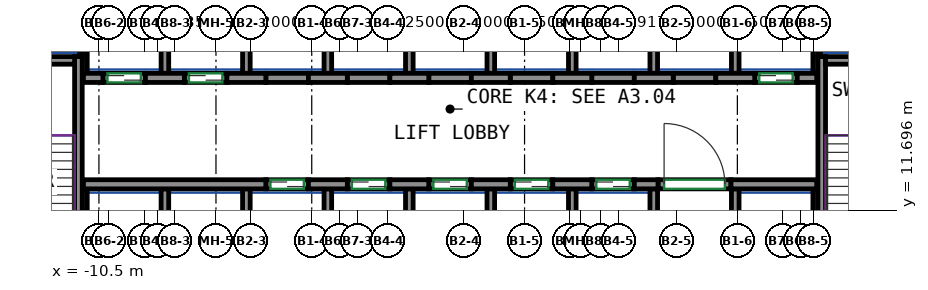
"""IFC4 building model, lengths in metres.
Left out: names, types, materials, properties, quantities, classifications, styles, units other than length and angle.
Written with IfcOpenShell. Run it as: python <this file> out.ifc"""

import sys

from ifc_helpers import new_model, si_unit, direction, frame, frame_2d, origin, place, context, subcontext, project, spatial, rectangle, extrude, source, transform, mapped, element, fill, save


model = new_model("IFC4")
c1 = context("Model", 3, precision=1e-05, world=origin(), true_north=direction((0.0, 1.0)))
c2 = subcontext(c1, "Body", "Model", "MODEL_VIEW")
j1 = project(units=[si_unit("LENGTHUNIT", "METRE"), si_unit("PLANEANGLEUNIT", "RADIAN")], contexts=[c1])
p1 = place(None, origin())
s1 = spatial("IfcSite", under=j1, at=p1, CompositionType="ELEMENT")
p2 = place(p1, origin())
s2 = spatial("IfcBuilding", under=s1, at=p2, CompositionType="ELEMENT")
p3 = place(p2, frame((0.0, 0.0, 18.0)))
s3 = spatial("IfcBuildingStorey", under=s2, at=p3, CompositionType="ELEMENT", Elevation=18.0)
m1 = source(origin(), c2, "Body", "SweptSolid", [
    extrude(rectangle(XDim=7.75, YDim=0.25, at=frame_2d((3.875, 0.0))), origin(), (0.0, 0.0, 1.0), 4.1),
])
p4 = place(p3, frame((-11.175, 9.0, 0.0), z_axis=(0.0, 0.0, 1.0), x_axis=(0.0, 1.0, 0.0)))
e1 = element("IfcWall", 1, at=p4, inside=s3, PredefinedType="SHEAR", context=c2, shape_type="MappedRepresentation", body=[
    mapped(m1, transform((0.0, 0.0, 0.0))),
])
m2 = source(origin(), c2, "Body", "SweptSolid", [
    extrude(rectangle(XDim=3.7, YDim=0.25, at=frame_2d((1.85, 0.0))), origin(), (0.0, 0.0, 1.0), 4.1),
])
p5 = place(p3, frame((-15.0, 16.625, 0.0), z_axis=(0.0, 0.0, 1.0), x_axis=(1.0, 0.0, 0.0)))
e2 = element("IfcWall", 2, at=p5, inside=s3, PredefinedType="SHEAR", context=c2, shape_type="MappedRepresentation", body=[
    mapped(m2, transform((0.0, 0.0, 0.0))),
])
p6 = place(p3, frame((13.275, 9.0, 0.0), z_axis=(0.0, 0.0, 1.0), x_axis=(0.0, 1.0, 0.0)))
e3 = element("IfcWall", 3, at=p6, inside=s3, PredefinedType="SHEAR", context=c2, shape_type="MappedRepresentation", body=[
    mapped(m1, transform((0.0, 0.0, 0.0))),
])
m3 = source(origin(), c2, "Body", "SweptSolid", [
    extrude(rectangle(XDim=3.7, YDim=0.25, at=frame_2d((1.85, 0.0))), origin(), (0.0, 0.0, 1.0), 4.1),
])
p7 = place(p3, frame((13.4, 16.625, 0.0), z_axis=(0.0, 0.0, 1.0), x_axis=(1.0, 0.0, 0.0)))
e4 = element("IfcWall", 4, at=p7, inside=s3, PredefinedType="SHEAR", context=c2, shape_type="MappedRepresentation", body=[
    mapped(m3, transform((0.0, 0.0, 0.0))),
])
m4 = source(origin(), c2, "Body", "SweptSolid", [
    extrude(rectangle(XDim=6.0, YDim=0.3, at=frame_2d((3.0, 0.0))), origin(), (0.0, 0.0, 1.0), 4.1),
])
p8 = place(p3, frame((-11.01, 12.55, 0.0), z_axis=(0.0, 0.0, 1.0), x_axis=(1.0, 0.0, 0.0)))
e5 = element("IfcWall", 5, at=p8, inside=s3, PredefinedType="SHEAR", context=c2, shape_type="MappedRepresentation", body=[
    mapped(m4, transform((0.0, 0.0, 0.0))),
])
m5 = source(origin(), c2, "Body", "SweptSolid", [
    extrude(rectangle(XDim=1.28, YDim=0.3, at=frame_2d((0.64, 0.0))), origin(), (0.0, 0.0, 1.0), 4.1),
])
for number, where, z_axis, x_axis in (
    (6, (-3.61, 12.55, 0.0), (0.0, 0.0, 1.0), (1.0, 0.0, 0.0)),
    (7, (-0.93, 12.55, 0.0), (0.0, 0.0, 1.0), (1.0, 0.0, 0.0)),
    (8, (1.75, 12.55, 0.0), (0.0, 0.0, 1.0), (1.0, 0.0, 0.0)),
    (9, (4.43, 12.55, 0.0), (0.0, 0.0, 1.0), (1.0, 0.0, 0.0)),
):
    element("IfcWall", number, at=place(p3, frame(where, z_axis=z_axis, x_axis=x_axis)), inside=s3, PredefinedType="SHEAR", context=c2, shape_type="MappedRepresentation", body=[
        mapped(m5, transform((0.0, 0.0, 0.0))),
    ])
m6 = source(origin(), c2, "Body", "SweptSolid", [
    extrude(rectangle(XDim=0.78, YDim=0.3, at=frame_2d((0.39, 0.0))), origin(), (0.0, 0.0, 1.0), 4.1),
])
p9 = place(p3, frame((7.11, 12.55, 0.0), z_axis=(0.0, 0.0, 1.0), x_axis=(1.0, 0.0, 0.0)))
e10 = element("IfcWall", 10, at=p9, inside=s3, PredefinedType="SHEAR", context=c2, shape_type="MappedRepresentation", body=[
    mapped(m6, transform((0.0, 0.0, 0.0))),
])
m7 = source(origin(), c2, "Body", "SweptSolid", [
    extrude(rectangle(XDim=2.82, YDim=0.3, at=frame_2d((1.41, 0.0))), origin(), (0.0, 0.0, 1.0), 4.1),
])
p10 = place(p3, frame((10.29, 12.55, 0.0), z_axis=(0.0, 0.0, 1.0), x_axis=(1.0, 0.0, 0.0)))
e11 = element("IfcWall", 11, at=p10, inside=s3, PredefinedType="SHEAR", context=c2, shape_type="MappedRepresentation", body=[
    mapped(m7, transform((0.0, 0.0, 0.0))),
])
m8 = source(origin(), c2, "Body", "SweptSolid", [
    extrude(rectangle(XDim=0.64, YDim=0.3, at=frame_2d((0.32, 0.0))), origin(), (0.0, 0.0, 1.0), 4.1),
])
p11 = place(p3, frame((-11.01, 16.05, 0.0), z_axis=(0.0, 0.0, 1.0), x_axis=(1.0, 0.0, 0.0)))
e12 = element("IfcWall", 12, at=p11, inside=s3, PredefinedType="SHEAR", context=c2, shape_type="MappedRepresentation", body=[
    mapped(m8, transform((0.0, 0.0, 0.0))),
])
for number, where, z_axis, x_axis in (
    (13, (-8.97, 16.05, 0.0), (0.0, 0.0, 1.0), (1.0, 0.0, 0.0)),
    (14, (-6.29, 16.05, 0.0), (0.0, 0.0, 1.0), (1.0, 0.0, 0.0)),
    (15, (-3.61, 16.05, 0.0), (0.0, 0.0, 1.0), (1.0, 0.0, 0.0)),
    (16, (-0.93, 16.05, 0.0), (0.0, 0.0, 1.0), (1.0, 0.0, 0.0)),
    (17, (1.75, 16.05, 0.0), (0.0, 0.0, 1.0), (1.0, 0.0, 0.0)),
    (18, (4.43, 16.05, 0.0), (0.0, 0.0, 1.0), (1.0, 0.0, 0.0)),
):
    element("IfcWall", number, at=place(p3, frame(where, z_axis=z_axis, x_axis=x_axis)), inside=s3, PredefinedType="SHEAR", context=c2, shape_type="MappedRepresentation", body=[
        mapped(m5, transform((0.0, 0.0, 0.0))),
    ])
m9 = source(origin(), c2, "Body", "SweptSolid", [
    extrude(rectangle(XDim=1.28, YDim=0.3, at=frame_2d((0.64, 0.0))), origin(), (0.0, 0.0, 1.0), 4.1),
])
p12 = place(p3, frame((7.11, 16.05, 0.0), z_axis=(0.0, 0.0, 1.0), x_axis=(1.0, 0.0, 0.0)))
e19 = element("IfcWall", 19, at=p12, inside=s3, PredefinedType="SHEAR", context=c2, shape_type="MappedRepresentation", body=[
    mapped(m9, transform((0.0, 0.0, 0.0))),
])
p13 = place(p3, frame((9.79, 16.05, 0.0), z_axis=(0.0, 0.0, 1.0), x_axis=(1.0, 0.0, 0.0)))
e20 = element("IfcWall", 20, at=p13, inside=s3, PredefinedType="SHEAR", context=c2, shape_type="MappedRepresentation", body=[
    mapped(m5, transform((0.0, 0.0, 0.0))),
])
m10 = source(origin(), c2, "Body", "SweptSolid", [
    extrude(rectangle(XDim=0.64, YDim=0.3, at=frame_2d((0.32, 0.0))), origin(), (0.0, 0.0, 1.0), 4.1),
])
p14 = place(p3, frame((12.47, 16.05, 0.0), z_axis=(0.0, 0.0, 1.0), x_axis=(1.0, 0.0, 0.0)))
e21 = element("IfcWall", 21, at=p14, inside=s3, PredefinedType="SHEAR", context=c2, shape_type="MappedRepresentation", body=[
    mapped(m10, transform((0.0, 0.0, 0.0))),
])
m11 = source(origin(), c2, "Body", "SweptSolid", [
    extrude(rectangle(XDim=1.4, YDim=0.3, at=frame_2d((0.7, 0.0))), origin(), (0.0, 0.0, 1.0), 4.1),
])
p15 = place(p3, frame((-5.01, 12.55, 0.0), z_axis=(0.0, 0.0, 1.0), x_axis=(1.0, 0.0, 0.0)))
e22 = element("IfcWall", 22, at=p15, inside=s3, PredefinedType="PARTITIONING", context=c2, shape_type="MappedRepresentation", body=[
    mapped(m11, transform((0.0, 0.0, 0.0))),
])
p16 = place(p15, frame((0.15, 0.0, 0.0)))
e23 = element("IfcOpeningElement", 23, at=p16, cuts=e22, PredefinedType="OPENING", context=c2, shape_type="SweptSolid", body=[
    extrude(rectangle(XDim=1.1, YDim=2.1, at=frame_2d((0.55, 1.05))), frame((0.0, 0.16, 0.0), z_axis=(0.0, -1.0, 0.0), x_axis=(1.0, 0.0, 0.0)), (0.0, 0.0, 1.0), 0.32),
])
m12 = source(origin(), c2, "Body", "SweptSolid", [
    extrude(rectangle(XDim=1.4, YDim=0.3, at=frame_2d((0.7, 0.0))), origin(), (0.0, 0.0, 1.0), 4.1),
])
p17 = place(p3, frame((-2.33, 12.55, 0.0), z_axis=(0.0, 0.0, 1.0), x_axis=(1.0, 0.0, 0.0)))
e24 = element("IfcWall", 24, at=p17, inside=s3, PredefinedType="PARTITIONING", context=c2, shape_type="MappedRepresentation", body=[
    mapped(m12, transform((0.0, 0.0, 0.0))),
])
p18 = place(p17, frame((0.15, 0.0, 0.0)))
e25 = element("IfcOpeningElement", 25, at=p18, cuts=e24, PredefinedType="OPENING", context=c2, shape_type="SweptSolid", body=[
    extrude(rectangle(XDim=1.1, YDim=2.1, at=frame_2d((0.55, 1.05))), frame((0.0, 0.16, 0.0), z_axis=(0.0, -1.0, 0.0), x_axis=(1.0, 0.0, 0.0)), (0.0, 0.0, 1.0), 0.32),
])
p19 = place(p3, frame((0.35, 12.55, 0.0), z_axis=(0.0, 0.0, 1.0), x_axis=(1.0, 0.0, 0.0)))
e26 = element("IfcWall", 26, at=p19, inside=s3, PredefinedType="PARTITIONING", context=c2, shape_type="MappedRepresentation", body=[
    mapped(m11, transform((0.0, 0.0, 0.0))),
])
p20 = place(p19, frame((0.15, 0.0, 0.0)))
e27 = element("IfcOpeningElement", 27, at=p20, cuts=e26, PredefinedType="OPENING", context=c2, shape_type="SweptSolid", body=[
    extrude(rectangle(XDim=1.1, YDim=2.1, at=frame_2d((0.55, 1.05))), frame((0.0, 0.16, 0.0), z_axis=(0.0, -1.0, 0.0), x_axis=(1.0, 0.0, 0.0)), (0.0, 0.0, 1.0), 0.32),
])
p21 = place(p3, frame((3.03, 12.55, 0.0), z_axis=(0.0, 0.0, 1.0), x_axis=(1.0, 0.0, 0.0)))
e28 = element("IfcWall", 28, at=p21, inside=s3, PredefinedType="PARTITIONING", context=c2, shape_type="MappedRepresentation", body=[
    mapped(m11, transform((0.0, 0.0, 0.0))),
])
p22 = place(p21, frame((0.15, 0.0, 0.0)))
e29 = element("IfcOpeningElement", 29, at=p22, cuts=e28, PredefinedType="OPENING", context=c2, shape_type="SweptSolid", body=[
    extrude(rectangle(XDim=1.1, YDim=2.1, at=frame_2d((0.55, 1.05))), frame((0.0, 0.16, 0.0), z_axis=(0.0, -1.0, 0.0), x_axis=(1.0, 0.0, 0.0)), (0.0, 0.0, 1.0), 0.32),
])
p23 = place(p3, frame((5.71, 12.55, 0.0), z_axis=(0.0, 0.0, 1.0), x_axis=(1.0, 0.0, 0.0)))
e30 = element("IfcWall", 30, at=p23, inside=s3, PredefinedType="PARTITIONING", context=c2, shape_type="MappedRepresentation", body=[
    mapped(m12, transform((0.0, 0.0, 0.0))),
])
p24 = place(p23, frame((0.15, 0.0, 0.0)))
e31 = element("IfcOpeningElement", 31, at=p24, cuts=e30, PredefinedType="OPENING", context=c2, shape_type="SweptSolid", body=[
    extrude(rectangle(XDim=1.1, YDim=2.1, at=frame_2d((0.55, 1.05))), frame((0.0, 0.16, 0.0), z_axis=(0.0, -1.0, 0.0), x_axis=(1.0, 0.0, 0.0)), (0.0, 0.0, 1.0), 0.32),
])
p25 = place(p3, frame((11.07, 16.05, 0.0), z_axis=(0.0, 0.0, 1.0), x_axis=(1.0, 0.0, 0.0)))
e32 = element("IfcWall", 32, at=p25, inside=s3, PredefinedType="PARTITIONING", context=c2, shape_type="MappedRepresentation", body=[
    mapped(m11, transform((0.0, 0.0, 0.0))),
])
p26 = place(p25, frame((0.15, 0.0, 0.0)))
e33 = element("IfcOpeningElement", 33, at=p26, cuts=e32, PredefinedType="OPENING", context=c2, shape_type="SweptSolid", body=[
    extrude(rectangle(XDim=1.1, YDim=2.1, at=frame_2d((0.55, 1.05))), frame((0.0, 0.16, 0.0), z_axis=(0.0, -1.0, 0.0), x_axis=(1.0, 0.0, 0.0)), (0.0, 0.0, 1.0), 0.32),
])
p27 = place(p3, frame((-10.37, 16.05, 0.0), z_axis=(0.0, 0.0, 1.0), x_axis=(1.0, 0.0, 0.0)))
e34 = element("IfcWall", 34, at=p27, inside=s3, PredefinedType="PARTITIONING", context=c2, shape_type="MappedRepresentation", body=[
    mapped(m12, transform((0.0, 0.0, 0.0))),
])
p28 = place(p27, frame((0.15, 0.0, 0.0)))
e35 = element("IfcOpeningElement", 35, at=p28, cuts=e34, PredefinedType="OPENING", context=c2, shape_type="SweptSolid", body=[
    extrude(rectangle(XDim=1.1, YDim=2.1, at=frame_2d((0.55, 1.05))), frame((0.0, 0.16, 0.0), z_axis=(0.0, -1.0, 0.0), x_axis=(1.0, 0.0, 0.0)), (0.0, 0.0, 1.0), 0.32),
])
p29 = place(p3, frame((-7.69, 16.05, 0.0), z_axis=(0.0, 0.0, 1.0), x_axis=(1.0, 0.0, 0.0)))
e36 = element("IfcWall", 36, at=p29, inside=s3, PredefinedType="PARTITIONING", context=c2, shape_type="MappedRepresentation", body=[
    mapped(m11, transform((0.0, 0.0, 0.0))),
])
p30 = place(p29, frame((0.15, 0.0, 0.0)))
e37 = element("IfcOpeningElement", 37, at=p30, cuts=e36, PredefinedType="OPENING", context=c2, shape_type="SweptSolid", body=[
    extrude(rectangle(XDim=1.1, YDim=2.1, at=frame_2d((0.55, 1.05))), frame((0.0, 0.16, 0.0), z_axis=(0.0, -1.0, 0.0), x_axis=(1.0, 0.0, 0.0)), (0.0, 0.0, 1.0), 0.32),
])
m13 = source(origin(), c2, "Body", "SweptSolid", [
    extrude(rectangle(XDim=2.4, YDim=0.3, at=frame_2d((1.2, 0.0))), origin(), (0.0, 0.0, 1.0), 4.1),
])
p31 = place(p3, frame((7.89, 12.55, 0.0), z_axis=(0.0, 0.0, 1.0), x_axis=(1.0, 0.0, 0.0)))
e38 = element("IfcWall", 38, at=p31, inside=s3, PredefinedType="PARTITIONING", context=c2, shape_type="MappedRepresentation", body=[
    mapped(m13, transform((0.0, 0.0, 0.0))),
])
p32 = place(p31, frame((0.2, 0.0, 0.0)))
e39 = element("IfcOpeningElement", 39, at=p32, cuts=e38, PredefinedType="OPENING", context=c2, shape_type="SweptSolid", body=[
    extrude(rectangle(XDim=2.0, YDim=2.1, at=frame_2d((1.0, 1.05))), frame((0.0, 0.16, 0.0), z_axis=(0.0, -1.0, 0.0), x_axis=(1.0, 0.0, 0.0)), (0.0, 0.0, 1.0), 0.32),
])
p33 = place(p3, frame((-5.01, 16.05, 0.0), z_axis=(0.0, 0.0, 1.0), x_axis=(1.0, 0.0, 0.0)))
e40 = element("IfcWall", 40, at=p33, inside=s3, PredefinedType="PARTITIONING", context=c2, shape_type="MappedRepresentation", body=[
    mapped(m11, transform((0.0, 0.0, 0.0))),
])
p34 = place(p3, frame((-2.33, 16.05, 0.0), z_axis=(0.0, 0.0, 1.0), x_axis=(1.0, 0.0, 0.0)))
e41 = element("IfcWall", 41, at=p34, inside=s3, PredefinedType="PARTITIONING", context=c2, shape_type="MappedRepresentation", body=[
    mapped(m12, transform((0.0, 0.0, 0.0))),
])
for number, where, z_axis, x_axis in (
    (42, (0.35, 16.05, 0.0), (0.0, 0.0, 1.0), (1.0, 0.0, 0.0)),
    (43, (3.03, 16.05, 0.0), (0.0, 0.0, 1.0), (1.0, 0.0, 0.0)),
):
    element("IfcWall", number, at=place(p3, frame(where, z_axis=z_axis, x_axis=x_axis)), inside=s3, PredefinedType="PARTITIONING", context=c2, shape_type="MappedRepresentation", body=[
        mapped(m11, transform((0.0, 0.0, 0.0))),
    ])
for number, where, z_axis, x_axis in (
    (44, (5.71, 16.05, 0.0), (0.0, 0.0, 1.0), (1.0, 0.0, 0.0)),
    (45, (8.39, 16.05, 0.0), (0.0, 0.0, 1.0), (1.0, 0.0, 0.0)),
):
    element("IfcWall", number, at=place(p3, frame(where, z_axis=z_axis, x_axis=x_axis)), inside=s3, PredefinedType="PARTITIONING", context=c2, shape_type="MappedRepresentation", body=[
        mapped(m12, transform((0.0, 0.0, 0.0))),
    ])
m14 = source(origin(), c2, "Body", "SweptSolid", [
    extrude(rectangle(XDim=3.275, YDim=0.165, at=frame_2d((1.638, 0.0))), origin(), (0.0, 0.0, 1.0), 4.1),
])
for number, where, z_axis, x_axis in (
    (46, (13.067, 16.2, 0.0), (0.0, 0.0, 1.0), (0.0, 1.0, 0.0)),
    (47, (-10.968, 16.2, 0.0), (0.0, 0.0, 1.0), (0.0, 1.0, 0.0)),
):
    element("IfcWall", number, at=place(p3, frame(where, z_axis=z_axis, x_axis=x_axis)), inside=s3, PredefinedType="PARTITIONING", context=c2, shape_type="MappedRepresentation", body=[
        mapped(m14, transform((0.0, 0.0, 0.0))),
    ])
m15 = source(origin(), c2, "Body", "SweptSolid", [
    extrude(rectangle(XDim=3.275, YDim=0.25, at=frame_2d((1.638, 0.0))), origin(), (0.0, 0.0, 1.0), 4.1),
])
p35 = place(p3, frame((10.43, 16.2, 0.0), z_axis=(0.0, 0.0, 1.0), x_axis=(0.0, 1.0, 0.0)))
e48 = element("IfcWall", 48, at=p35, inside=s3, PredefinedType="PARTITIONING", context=c2, shape_type="MappedRepresentation", body=[
    mapped(m15, transform((0.0, 0.0, 0.0))),
])
m16 = source(origin(), c2, "Body", "SweptSolid", [
    extrude(rectangle(XDim=2.725, YDim=0.085, at=frame_2d((1.363, 0.0))), origin(), (0.0, 0.0, 1.0), 4.1),
])
p36 = place(p3, frame((13.192, 16.75, 0.0), z_axis=(0.0, 0.0, 1.0), x_axis=(0.0, 1.0, 0.0)))
e49 = element("IfcWall", 49, at=p36, inside=s3, PredefinedType="PARTITIONING", context=c2, shape_type="MappedRepresentation", body=[
    mapped(m16, transform((0.0, 0.0, 0.0))),
])
for number, where, z_axis, x_axis in (
    (50, (2.39, 16.2, 0.0), (0.0, 0.0, 1.0), (0.0, 1.0, 0.0)),
    (51, (5.07, 16.2, 0.0), (0.0, 0.0, 1.0), (0.0, 1.0, 0.0)),
    (52, (7.75, 16.2, 0.0), (0.0, 0.0, 1.0), (0.0, 1.0, 0.0)),
    (53, (-0.29, 16.2, 0.0), (0.0, 0.0, 1.0), (0.0, 1.0, 0.0)),
):
    element("IfcWall", number, at=place(p3, frame(where, z_axis=z_axis, x_axis=x_axis)), inside=s3, PredefinedType="PARTITIONING", context=c2, shape_type="MappedRepresentation", body=[
        mapped(m15, transform((0.0, 0.0, 0.0))),
    ])
p37 = place(p3, frame((-11.093, 16.75, 0.0), z_axis=(0.0, 0.0, 1.0), x_axis=(0.0, 1.0, 0.0)))
e54 = element("IfcWall", 54, at=p37, inside=s3, PredefinedType="PARTITIONING", context=c2, shape_type="MappedRepresentation", body=[
    mapped(m16, transform((0.0, 0.0, 0.0))),
])
for number, where, z_axis, x_axis in (
    (55, (-2.97, 16.2, 0.0), (0.0, 0.0, 1.0), (0.0, 1.0, 0.0)),
    (56, (-5.65, 16.2, 0.0), (0.0, 0.0, 1.0), (0.0, 1.0, 0.0)),
    (57, (-8.33, 16.2, 0.0), (0.0, 0.0, 1.0), (0.0, 1.0, 0.0)),
):
    element("IfcWall", number, at=place(p3, frame(where, z_axis=z_axis, x_axis=x_axis)), inside=s3, PredefinedType="PARTITIONING", context=c2, shape_type="MappedRepresentation", body=[
        mapped(m15, transform((0.0, 0.0, 0.0))),
    ])
m17 = source(origin(), c2, "Body", "SweptSolid", [
    extrude(rectangle(XDim=3.4, YDim=0.25, at=frame_2d((1.7, 0.0))), origin(), (0.0, 0.0, 1.0), 4.1),
])
p38 = place(p3, frame((10.43, 9.0, 0.0), z_axis=(0.0, 0.0, 1.0), x_axis=(0.0, 1.0, 0.0)))
e58 = element("IfcWall", 58, at=p38, inside=s3, PredefinedType="PARTITIONING", context=c2, shape_type="MappedRepresentation", body=[
    mapped(m17, transform((0.0, 0.0, 0.0))),
])
m18 = source(origin(), c2, "Body", "SweptSolid", [
    extrude(rectangle(XDim=3.4, YDim=0.165, at=frame_2d((1.7, 0.0))), origin(), (0.0, 0.0, 1.0), 4.1),
])
p39 = place(p3, frame((13.067, 9.0, 0.0), z_axis=(0.0, 0.0, 1.0), x_axis=(0.0, 1.0, 0.0)))
e59 = element("IfcWall", 59, at=p39, inside=s3, PredefinedType="PARTITIONING", context=c2, shape_type="MappedRepresentation", body=[
    mapped(m18, transform((0.0, 0.0, 0.0))),
])
for number, where, z_axis, x_axis in (
    (60, (2.39, 9.0, 0.0), (0.0, 0.0, 1.0), (0.0, 1.0, 0.0)),
    (61, (5.07, 9.0, 0.0), (0.0, 0.0, 1.0), (0.0, 1.0, 0.0)),
    (62, (7.75, 9.0, 0.0), (0.0, 0.0, 1.0), (0.0, 1.0, 0.0)),
    (63, (-0.29, 9.0, 0.0), (0.0, 0.0, 1.0), (0.0, 1.0, 0.0)),
):
    element("IfcWall", number, at=place(p3, frame(where, z_axis=z_axis, x_axis=x_axis)), inside=s3, PredefinedType="PARTITIONING", context=c2, shape_type="MappedRepresentation", body=[
        mapped(m17, transform((0.0, 0.0, 0.0))),
    ])
p40 = place(p3, frame((-10.968, 9.0, 0.0), z_axis=(0.0, 0.0, 1.0), x_axis=(0.0, 1.0, 0.0)))
e64 = element("IfcWall", 64, at=p40, inside=s3, PredefinedType="PARTITIONING", context=c2, shape_type="MappedRepresentation", body=[
    mapped(m18, transform((0.0, 0.0, 0.0))),
])
for number, where, z_axis, x_axis in (
    (65, (-2.97, 9.0, 0.0), (0.0, 0.0, 1.0), (0.0, 1.0, 0.0)),
    (66, (-5.65, 9.0, 0.0), (0.0, 0.0, 1.0), (0.0, 1.0, 0.0)),
    (67, (-8.33, 9.0, 0.0), (0.0, 0.0, 1.0), (0.0, 1.0, 0.0)),
):
    element("IfcWall", number, at=place(p3, frame(where, z_axis=z_axis, x_axis=x_axis)), inside=s3, PredefinedType="PARTITIONING", context=c2, shape_type="MappedRepresentation", body=[
        mapped(m17, transform((0.0, 0.0, 0.0))),
    ])
p41 = place(p32, origin())
e68 = element("IfcDoor", 68, at=p41, inside=s3, OperationType="DOUBLE_DOOR_SINGLE_SWING", PredefinedType="DOOR", context=c2, shape_type="SweptSolid", body=[
    extrude(rectangle(XDim=2.0, YDim=2.1, at=frame_2d((1.0, 1.05))), frame((0.0, 0.025, 0.0), z_axis=(0.0, -1.0, 0.0), x_axis=(1.0, 0.0, 0.0)), (0.0, 0.0, 1.0), 0.05),
])
fill(e39, e68)
p42 = place(p16, origin())
e69 = element("IfcDoor", 69, at=p42, inside=s3, OperationType="DOUBLE_DOOR_SLIDING", PredefinedType="DOOR", context=c2, shape_type="SweptSolid", body=[
    extrude(rectangle(XDim=1.1, YDim=2.1, at=frame_2d((0.55, 1.05))), frame((0.0, 0.025, 0.0), z_axis=(0.0, -1.0, 0.0), x_axis=(1.0, 0.0, 0.0)), (0.0, 0.0, 1.0), 0.05),
])
fill(e23, e69)
p43 = place(p18, origin())
e70 = element("IfcDoor", 70, at=p43, inside=s3, OperationType="DOUBLE_DOOR_SLIDING", PredefinedType="DOOR", context=c2, shape_type="SweptSolid", body=[
    extrude(rectangle(XDim=1.1, YDim=2.1, at=frame_2d((0.55, 1.05))), frame((0.0, 0.025, 0.0), z_axis=(0.0, -1.0, 0.0), x_axis=(1.0, 0.0, 0.0)), (0.0, 0.0, 1.0), 0.05),
])
fill(e25, e70)
p44 = place(p20, origin())
e71 = element("IfcDoor", 71, at=p44, inside=s3, OperationType="DOUBLE_DOOR_SLIDING", PredefinedType="DOOR", context=c2, shape_type="SweptSolid", body=[
    extrude(rectangle(XDim=1.1, YDim=2.1, at=frame_2d((0.55, 1.05))), frame((0.0, 0.025, 0.0), z_axis=(0.0, -1.0, 0.0), x_axis=(1.0, 0.0, 0.0)), (0.0, 0.0, 1.0), 0.05),
])
fill(e27, e71)
p45 = place(p22, origin())
e72 = element("IfcDoor", 72, at=p45, inside=s3, OperationType="DOUBLE_DOOR_SLIDING", PredefinedType="DOOR", context=c2, shape_type="SweptSolid", body=[
    extrude(rectangle(XDim=1.1, YDim=2.1, at=frame_2d((0.55, 1.05))), frame((0.0, 0.025, 0.0), z_axis=(0.0, -1.0, 0.0), x_axis=(1.0, 0.0, 0.0)), (0.0, 0.0, 1.0), 0.05),
])
fill(e29, e72)
p46 = place(p24, origin())
e73 = element("IfcDoor", 73, at=p46, inside=s3, OperationType="DOUBLE_DOOR_SLIDING", PredefinedType="DOOR", context=c2, shape_type="SweptSolid", body=[
    extrude(rectangle(XDim=1.1, YDim=2.1, at=frame_2d((0.55, 1.05))), frame((0.0, 0.025, 0.0), z_axis=(0.0, -1.0, 0.0), x_axis=(1.0, 0.0, 0.0)), (0.0, 0.0, 1.0), 0.05),
])
fill(e31, e73)
p47 = place(p26, origin())
e74 = element("IfcDoor", 74, at=p47, inside=s3, OperationType="DOUBLE_DOOR_SLIDING", PredefinedType="DOOR", context=c2, shape_type="SweptSolid", body=[
    extrude(rectangle(XDim=1.1, YDim=2.1, at=frame_2d((0.55, 1.05))), frame((0.0, 0.025, 0.0), z_axis=(0.0, -1.0, 0.0), x_axis=(1.0, 0.0, 0.0)), (0.0, 0.0, 1.0), 0.05),
])
fill(e33, e74)
p48 = place(p28, origin())
e75 = element("IfcDoor", 75, at=p48, inside=s3, OperationType="DOUBLE_DOOR_SLIDING", PredefinedType="DOOR", context=c2, shape_type="SweptSolid", body=[
    extrude(rectangle(XDim=1.1, YDim=2.1, at=frame_2d((0.55, 1.05))), frame((0.0, 0.025, 0.0), z_axis=(0.0, -1.0, 0.0), x_axis=(1.0, 0.0, 0.0)), (0.0, 0.0, 1.0), 0.05),
])
fill(e35, e75)
p49 = place(p30, origin())
e76 = element("IfcDoor", 76, at=p49, inside=s3, OperationType="DOUBLE_DOOR_SLIDING", PredefinedType="DOOR", context=c2, shape_type="SweptSolid", body=[
    extrude(rectangle(XDim=1.1, YDim=2.1, at=frame_2d((0.55, 1.05))), frame((0.0, 0.025, 0.0), z_axis=(0.0, -1.0, 0.0), x_axis=(1.0, 0.0, 0.0)), (0.0, 0.0, 1.0), 0.05),
])
fill(e37, e76)
save(model, sys.argv[1])
